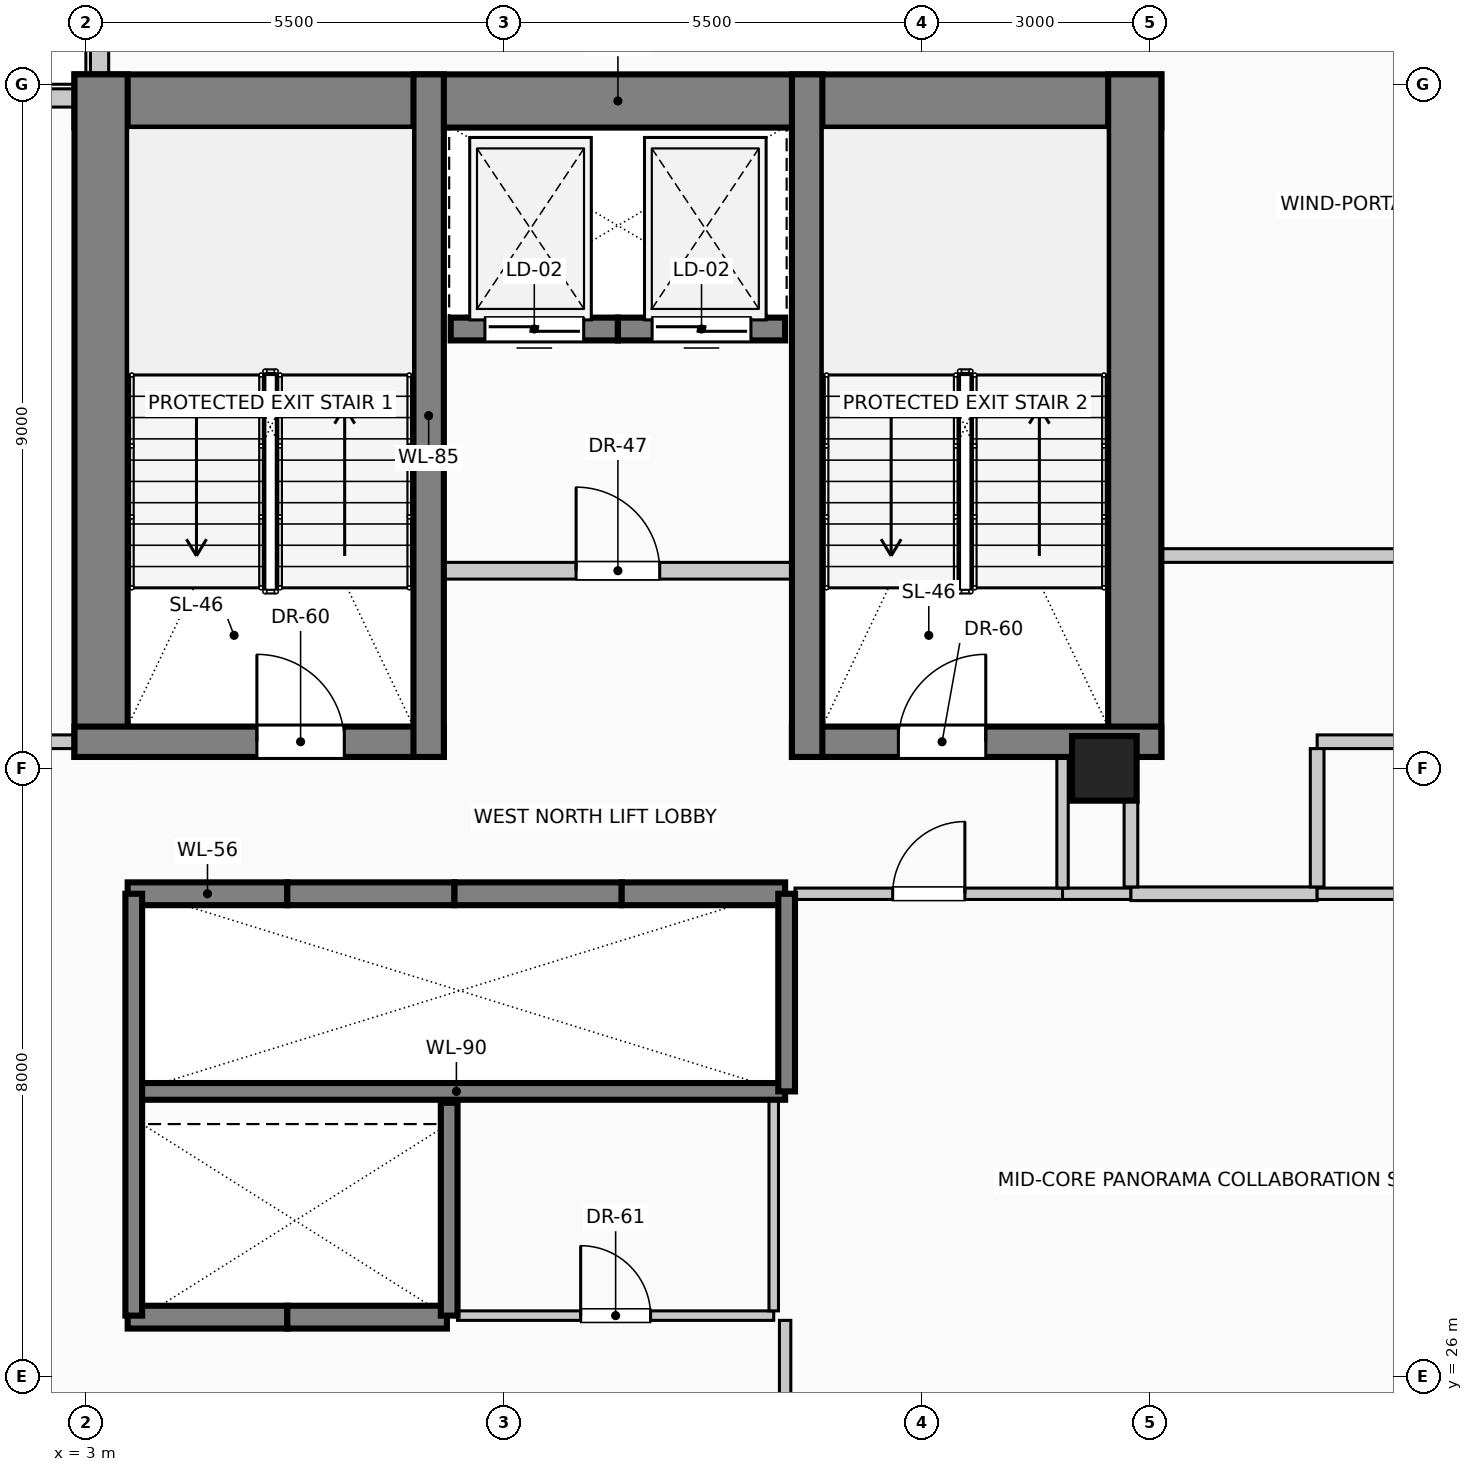
"""IFC4 building model, lengths in metres.
Left out: names, types, materials, properties, quantities, classifications, styles, units other than length and angle.
Written with IfcOpenShell. Run it as: python <this file> out.ifc"""

import sys

from ifc_helpers import new_model, si_unit, direction, frame, frame_2d, origin, origin_2d, place, context, subcontext, project, spatial, rectangle, circle, extrude, element, fill, save


model = new_model("IFC4")
c1 = context("Model", 3, precision=1e-05, world=origin(), true_north=direction((0.0, 1.0)))
c2 = subcontext(c1, "Body", "Model", "MODEL_VIEW")
j1 = project(units=[si_unit("LENGTHUNIT", "METRE"), si_unit("PLANEANGLEUNIT", "RADIAN")], contexts=[c1])
p1 = place(None, origin())
s1 = spatial("IfcSite", under=j1, at=p1, CompositionType="ELEMENT")
p2 = place(p1, origin())
s2 = spatial("IfcBuilding", under=s1, at=p2, CompositionType="ELEMENT")
p3 = place(p2, frame((0.0, 0.0, 198.6)))
s3 = spatial("IfcBuildingStorey", under=s2, at=p3, CompositionType="ELEMENT", Elevation=198.6)
p4 = place(p3, frame((2.85, 42.78, 0.0), z_axis=(0.0, 0.0, 1.0), x_axis=(1.0, 0.0, 0.0)))
e1 = element("IfcWall", 1, at=p4, inside=s3, PredefinedType="SHEAR", context=c2, shape_type="SweptSolid", body=[
    extrude(rectangle(XDim=14.3, YDim=0.7, at=frame_2d((7.15, 0.0))), origin(), (0.0, 0.0, 1.0), 4.0),
])
for number, where, z_axis, x_axis in (
    (2, (3.2, 34.15, 0.0), (0.0, 0.0, 1.0), (0.0, 1.0, 0.0)),
    (3, (16.8, 34.15, 0.0), (0.0, 0.0, 1.0), (0.0, 1.0, 0.0)),
):
    element("IfcWall", number, at=place(p3, frame(where, z_axis=z_axis, x_axis=x_axis)), inside=s3, PredefinedType="SHEAR", context=c2, shape_type="SweptSolid", body=[
        extrude(rectangle(XDim=8.98, YDim=0.7, at=frame_2d((4.49, 0.0))), origin(), (0.0, 0.0, 1.0), 4.0),
    ])
p5 = place(p3, frame((2.85, 34.35, 0.0), z_axis=(0.0, 0.0, 1.0), x_axis=(1.0, 0.0, 0.0)))
e4 = element("IfcWall", 4, at=p5, inside=s3, PredefinedType="SHEAR", context=c2, shape_type="SweptSolid", body=[
    extrude(rectangle(XDim=4.86, YDim=0.4, at=frame_2d((2.43, 0.0))), origin(), (0.0, 0.0, 1.0), 4.0),
])
p6 = place(p5, frame((2.4, 0.0, 0.0)))
e5 = element("IfcOpeningElement", 5, at=p6, cuts=e4, PredefinedType="OPENING", context=c2, shape_type="SweptSolid", body=[
    extrude(rectangle(XDim=1.15, YDim=2.2, at=frame_2d((0.575, 1.1))), frame((0.0, 0.21, 0.0), z_axis=(0.0, -1.0, 0.0), x_axis=(1.0, 0.0, 0.0)), (0.0, 0.0, 1.0), 0.42),
])
p7 = place(p3, frame((12.29, 34.35, 0.0), z_axis=(0.0, 0.0, 1.0), x_axis=(1.0, 0.0, 0.0)))
e6 = element("IfcWall", 6, at=p7, inside=s3, PredefinedType="SHEAR", context=c2, shape_type="SweptSolid", body=[
    extrude(rectangle(XDim=4.86, YDim=0.4, at=frame_2d((2.43, 0.0))), origin(), (0.0, 0.0, 1.0), 4.0),
])
p8 = place(p7, frame((1.4, 0.0, 0.0)))
e7 = element("IfcOpeningElement", 7, at=p8, cuts=e6, PredefinedType="OPENING", context=c2, shape_type="SweptSolid", body=[
    extrude(rectangle(XDim=1.15, YDim=2.2, at=frame_2d((0.575, 1.1))), frame((0.0, 0.21, 0.0), z_axis=(0.0, -1.0, 0.0), x_axis=(1.0, 0.0, 0.0)), (0.0, 0.0, 1.0), 0.42),
])
for number, where, z_axis, x_axis in (
    (8, (7.51, 34.15, 0.0), (0.0, 0.0, 1.0), (0.0, 1.0, 0.0)),
    (9, (12.49, 34.15, 0.0), (0.0, 0.0, 1.0), (0.0, 1.0, 0.0)),
):
    element("IfcWall", number, at=place(p3, frame(where, z_axis=z_axis, x_axis=x_axis)), inside=s3, PredefinedType="SHEAR", context=c2, shape_type="SweptSolid", body=[
        extrude(rectangle(XDim=8.98, YDim=0.4, at=frame_2d((4.49, 0.0))), origin(), (0.0, 0.0, 1.0), 4.0),
    ])
p9 = place(p3, frame((16.4, 34.0, 0.0), z_axis=(0.0, 0.0, 1.0), x_axis=(1.0, 0.0, 0.0)))
e10 = element("IfcColumn", 10, at=p9, inside=s3, PredefinedType="COLUMN", context=c2, shape_type="SweptSolid", body=[
    extrude(circle(Radius=0.425, at=origin_2d()), origin(), (0.0, 0.0, 1.0), 4.0),
])
p10 = place(p3, frame((0.6, 42.82, 0.0), z_axis=(0.0, 0.0, 1.0), x_axis=(1.0, 0.0, 0.0)))
e11 = element("IfcWall", 11, at=p10, inside=s3, PredefinedType="SOLIDWALL", context=c2, shape_type="SweptSolid", body=[
    extrude(rectangle(XDim=2.245, YDim=0.24, at=frame_2d((1.123, 0.0))), origin(), (0.0, 0.0, 1.0), 3.75),
])
p11 = place(p3, frame((3.18, 43.135, 0.0), z_axis=(0.0, 0.0, 1.0), x_axis=(0.0, 1.0, 0.0)))
e12 = element("IfcWall", 12, at=p11, inside=s3, PredefinedType="SOLIDWALL", context=c2, shape_type="SweptSolid", body=[
    extrude(rectangle(XDim=2.265, YDim=0.24, at=frame_2d((1.132, 0.0))), origin(), (0.0, 0.0, 1.0), 3.75),
])
p12 = place(p3, frame((3.55, 32.35, 0.0), z_axis=(0.0, 0.0, 1.0), x_axis=(1.0, 0.0, 0.0)))
e13 = element("IfcWall", 13, at=p12, inside=s3, PredefinedType="SOLIDWALL", context=c2, shape_type="SweptSolid", body=[
    extrude(rectangle(XDim=2.1, YDim=0.3, at=frame_2d((1.05, 0.0))), origin(), (0.0, 0.0, 1.0), 4.0),
])
p13 = place(p3, frame((5.65, 32.35, 0.0), z_axis=(0.0, 0.0, 1.0), x_axis=(1.0, 0.0, 0.0)))
e14 = element("IfcWall", 14, at=p13, inside=s3, PredefinedType="SOLIDWALL", context=c2, shape_type="SweptSolid", body=[
    extrude(rectangle(XDim=2.2, YDim=0.3, at=frame_2d((1.1, 0.0))), origin(), (0.0, 0.0, 1.0), 4.0),
])
p14 = place(p3, frame((7.85, 32.35, 0.0), z_axis=(0.0, 0.0, 1.0), x_axis=(1.0, 0.0, 0.0)))
e15 = element("IfcWall", 15, at=p14, inside=s3, PredefinedType="SOLIDWALL", context=c2, shape_type="SweptSolid", body=[
    extrude(rectangle(XDim=2.2, YDim=0.3, at=frame_2d((1.1, 0.0))), origin(), (0.0, 0.0, 1.0), 4.0),
])
p15 = place(p3, frame((10.05, 32.35, 0.0), z_axis=(0.0, 0.0, 1.0), x_axis=(1.0, 0.0, 0.0)))
e16 = element("IfcWall", 16, at=p15, inside=s3, PredefinedType="SOLIDWALL", context=c2, shape_type="SweptSolid", body=[
    extrude(rectangle(XDim=2.15, YDim=0.3, at=frame_2d((1.075, 0.0))), origin(), (0.0, 0.0, 1.0), 4.0),
])
p16 = place(p3, frame((5.65, 26.78, 0.0), z_axis=(0.0, 0.0, 1.0), x_axis=(-1.0, 0.0, 0.0)))
e17 = element("IfcWall", 17, at=p16, inside=s3, PredefinedType="SOLIDWALL", context=c2, shape_type="SweptSolid", body=[
    extrude(rectangle(XDim=2.1, YDim=0.3, at=frame_2d((1.05, 0.0))), origin(), (0.0, 0.0, 1.0), 4.0),
])
p17 = place(p3, frame((7.75, 26.78, 0.0), z_axis=(0.0, 0.0, 1.0), x_axis=(-1.0, 0.0, 0.0)))
e18 = element("IfcWall", 18, at=p17, inside=s3, PredefinedType="SOLIDWALL", context=c2, shape_type="SweptSolid", body=[
    extrude(rectangle(XDim=2.1, YDim=0.3, at=frame_2d((1.05, 0.0))), origin(), (0.0, 0.0, 1.0), 4.0),
])
p18 = place(p3, frame((10.0, 39.78, 0.0), z_axis=(0.0, 0.0, 1.0), x_axis=(-1.0, 0.0, 0.0)))
e19 = element("IfcWall", 19, at=p18, inside=s3, PredefinedType="SOLIDWALL", context=c2, shape_type="SweptSolid", body=[
    extrude(rectangle(XDim=2.2, YDim=0.3, at=frame_2d((1.1, 0.0))), origin(), (0.0, 0.0, 1.0), 4.0),
])
p19 = place(p18, frame((0.45, 0.0, 0.0)))
e20 = element("IfcOpeningElement", 20, at=p19, cuts=e19, PredefinedType="OPENING", context=c2, shape_type="SweptSolid", body=[
    extrude(rectangle(XDim=1.3, YDim=2.25, at=frame_2d((0.65, 1.125))), frame((0.0, 0.16, 0.0), z_axis=(0.0, -1.0, 0.0), x_axis=(1.0, 0.0, 0.0)), (0.0, 0.0, 1.0), 0.32),
])
p20 = place(p3, frame((12.2, 39.78, 0.0), z_axis=(0.0, 0.0, 1.0), x_axis=(-1.0, 0.0, 0.0)))
e21 = element("IfcWall", 21, at=p20, inside=s3, PredefinedType="SOLIDWALL", context=c2, shape_type="SweptSolid", body=[
    extrude(rectangle(XDim=2.2, YDim=0.3, at=frame_2d((1.1, 0.0))), origin(), (0.0, 0.0, 1.0), 4.0),
])
p21 = place(p20, frame((0.45, 0.0, 0.0)))
e22 = element("IfcOpeningElement", 22, at=p21, cuts=e21, PredefinedType="OPENING", context=c2, shape_type="SweptSolid", body=[
    extrude(rectangle(XDim=1.3, YDim=2.25, at=frame_2d((0.65, 1.125))), frame((0.0, 0.16, 0.0), z_axis=(0.0, -1.0, 0.0), x_axis=(1.0, 0.0, 0.0)), (0.0, 0.0, 1.0), 0.32),
])
p22 = place(p3, frame((3.55, 29.75, 0.0), z_axis=(0.0, 0.0, 1.0), x_axis=(1.0, 0.0, 0.0)))
e23 = element("IfcWall", 23, at=p22, inside=s3, PredefinedType="SOLIDWALL", context=c2, shape_type="SweptSolid", body=[
    extrude(rectangle(XDim=8.65, YDim=0.22, at=frame_2d((4.325, 0.0))), origin(), (0.0, 0.0, 1.0), 4.0),
])
p23 = place(p3, frame((3.63, 26.8, 0.0), z_axis=(0.0, 0.0, 1.0), x_axis=(0.0, 1.0, 0.0)))
e24 = element("IfcWall", 24, at=p23, inside=s3, PredefinedType="SOLIDWALL", context=c2, shape_type="SweptSolid", body=[
    extrude(rectangle(XDim=5.55, YDim=0.22, at=frame_2d((2.775, 0.0))), origin(), (0.0, 0.0, 1.0), 4.0),
])
p24 = place(p3, frame((7.78, 26.8, 0.0), z_axis=(0.0, 0.0, 1.0), x_axis=(0.0, 1.0, 0.0)))
e25 = element("IfcWall", 25, at=p24, inside=s3, PredefinedType="SOLIDWALL", context=c2, shape_type="SweptSolid", body=[
    extrude(rectangle(XDim=2.8, YDim=0.22, at=frame_2d((1.4, 0.0))), origin(), (0.0, 0.0, 1.0), 4.0),
])
p25 = place(p3, frame((12.22, 29.75, 0.0), z_axis=(0.0, 0.0, 1.0), x_axis=(0.0, 1.0, 0.0)))
e26 = element("IfcWall", 26, at=p25, inside=s3, PredefinedType="SOLIDWALL", context=c2, shape_type="SweptSolid", body=[
    extrude(rectangle(XDim=2.6, YDim=0.22, at=frame_2d((1.3, 0.0))), origin(), (0.0, 0.0, 1.0), 4.0),
])
p26 = place(p3, frame((7.51, 36.6, 0.0), z_axis=(0.0, 0.0, 1.0), x_axis=(1.0, 0.0, 0.0)))
e27 = element("IfcWall", 27, at=p26, inside=s3, PredefinedType="PARTITIONING", context=c2, shape_type="SweptSolid", body=[
    extrude(rectangle(XDim=4.98, YDim=0.22, at=frame_2d((2.49, 0.0))), origin(), (0.0, 0.0, 1.0), 3.75),
])
p27 = place(p26, frame((1.94, 0.0, 0.0)))
e28 = element("IfcOpeningElement", 28, at=p27, cuts=e27, PredefinedType="OPENING", context=c2, shape_type="SweptSolid", body=[
    extrude(rectangle(XDim=1.1, YDim=2.2, at=frame_2d((0.55, 1.1))), frame((0.0, 0.12, 0.0), z_axis=(0.0, -1.0, 0.0), x_axis=(1.0, 0.0, 0.0)), (0.0, 0.0, 1.0), 0.24),
])
p28 = place(p3, frame((7.89, 26.8, 0.0), z_axis=(0.0, 0.0, 1.0), x_axis=(1.0, 0.0, 0.0)))
e29 = element("IfcWall", 29, at=p28, inside=s3, PredefinedType="PARTITIONING", context=c2, shape_type="SweptSolid", body=[
    extrude(rectangle(XDim=4.16, YDim=0.125, at=frame_2d((2.08, 0.0))), origin(), (0.0, 0.0, 1.0), 3.75),
])
p29 = place(p28, frame((1.62, 0.0, 0.0)))
e30 = element("IfcOpeningElement", 30, at=p29, cuts=e29, PredefinedType="OPENING", context=c2, shape_type="SweptSolid", body=[
    extrude(rectangle(XDim=0.92, YDim=2.1, at=frame_2d((0.46, 1.05))), frame((0.0, 0.073, 0.0), z_axis=(0.0, -1.0, 0.0), x_axis=(1.0, 0.0, 0.0)), (0.0, 0.0, 1.0), 0.145),
])
p30 = place(p3, frame((12.33, 32.35, 0.0), z_axis=(0.0, 0.0, 1.0), x_axis=(1.0, 0.0, 0.0)))
e31 = element("IfcWall", 31, at=p30, inside=s3, PredefinedType="PARTITIONING", context=c2, shape_type="SweptSolid", body=[
    extrude(rectangle(XDim=3.52, YDim=0.15, at=frame_2d((1.76, 0.0))), origin(), (0.0, 0.0, 1.0), 3.75),
])
p31 = place(p30, frame((1.285, 0.0, 0.0)))
e32 = element("IfcOpeningElement", 32, at=p31, cuts=e31, PredefinedType="OPENING", context=c2, shape_type="SweptSolid", body=[
    extrude(rectangle(XDim=0.95, YDim=2.15, at=frame_2d((0.475, 1.075))), frame((0.0, 0.085, 0.0), z_axis=(0.0, -1.0, 0.0), x_axis=(1.0, 0.0, 0.0)), (0.0, 0.0, 1.0), 0.17),
])
p32 = place(p3, frame((15.85, 32.35, 0.0), z_axis=(0.0, 0.0, 1.0), x_axis=(1.0, 0.0, 0.0)))
e33 = element("IfcWall", 33, at=p32, inside=s3, PredefinedType="PARTITIONING", context=c2, shape_type="SweptSolid", body=[
    extrude(rectangle(XDim=0.9, YDim=0.15, at=frame_2d((0.45, 0.0))), origin(), (0.0, 0.0, 1.0), 3.75),
])
p33 = place(p3, frame((16.75, 32.35, 0.0), z_axis=(0.0, 0.0, 1.0), x_axis=(1.0, 0.0, 0.0)))
e34 = element("IfcWall", 34, at=p33, inside=s3, PredefinedType="PARTITIONING", context=c2, shape_type="SweptSolid", body=[
    extrude(rectangle(XDim=2.45, YDim=0.18, at=frame_2d((1.225, 0.0))), origin(), (0.0, 0.0, 1.0), 3.75),
])
p34 = place(p3, frame((19.2, 32.35, 0.0), z_axis=(0.0, 0.0, 1.0), x_axis=(1.0, 0.0, 0.0)))
e35 = element("IfcWall", 35, at=p34, inside=s3, PredefinedType="PARTITIONING", context=c2, shape_type="SweptSolid", body=[
    extrude(rectangle(XDim=4.68, YDim=0.15, at=frame_2d((2.34, 0.0))), origin(), (0.0, 0.0, 1.0), 3.75),
])
p35 = place(p3, frame((1.15, 34.35, 0.0), z_axis=(0.0, 0.0, 1.0), x_axis=(1.0, 0.0, 0.0)))
e36 = element("IfcWall", 36, at=p35, inside=s3, PredefinedType="PARTITIONING", context=c2, shape_type="SweptSolid", body=[
    extrude(rectangle(XDim=1.7, YDim=0.18, at=frame_2d((0.85, 0.0))), origin(), (0.0, 0.0, 1.0), 3.75),
])
p36 = place(p3, frame((19.2, 34.35, 0.0), z_axis=(0.0, 0.0, 1.0), x_axis=(1.0, 0.0, 0.0)))
e37 = element("IfcWall", 37, at=p36, inside=s3, PredefinedType="PARTITIONING", context=c2, shape_type="SweptSolid", body=[
    extrude(rectangle(XDim=4.3, YDim=0.18, at=frame_2d((2.15, 0.0))), origin(), (0.0, 0.0, 1.0), 3.75),
])
p37 = place(p3, frame((17.15, 36.8, 0.0), z_axis=(0.0, 0.0, 1.0), x_axis=(1.0, 0.0, 0.0)))
e38 = element("IfcWall", 38, at=p37, inside=s3, PredefinedType="PARTITIONING", context=c2, shape_type="SweptSolid", body=[
    extrude(rectangle(XDim=8.35, YDim=0.18, at=frame_2d((4.175, 0.0))), origin(), (0.0, 0.0, 1.0), 3.75),
])
p38 = place(p37, frame((3.7, 0.0, 0.0)))
e39 = element("IfcOpeningElement", 39, at=p38, cuts=e38, PredefinedType="OPENING", context=c2, shape_type="SweptSolid", body=[
    extrude(rectangle(XDim=0.95, YDim=2.15, at=frame_2d((0.475, 1.075))), frame((0.0, 0.1, 0.0), z_axis=(0.0, -1.0, 0.0), x_axis=(1.0, 0.0, 0.0)), (0.0, 0.0, 1.0), 0.2),
])
p39 = place(p3, frame((12.05, 26.863, 0.0), z_axis=(0.0, 0.0, 1.0), x_axis=(0.0, 1.0, 0.0)))
e40 = element("IfcWall", 40, at=p39, inside=s3, PredefinedType="PARTITIONING", context=c2, shape_type="SweptSolid", body=[
    extrude(rectangle(XDim=2.777, YDim=0.125, at=frame_2d((1.389, 0.0))), origin(), (0.0, 0.0, 1.0), 3.75),
])
p40 = place(p3, frame((12.2, 24.863, 0.0), z_axis=(0.0, 0.0, 1.0), x_axis=(0.0, 1.0, 0.0)))
e41 = element("IfcWall", 41, at=p40, inside=s3, PredefinedType="PARTITIONING", context=c2, shape_type="SweptSolid", body=[
    extrude(rectangle(XDim=1.875, YDim=0.15, at=frame_2d((0.938, 0.0))), origin(), (0.0, 0.0, 1.0), 3.75),
])
p41 = place(p3, frame((15.85, 32.425, 0.0), z_axis=(0.0, 0.0, 1.0), x_axis=(0.0, 1.0, 0.0)))
e42 = element("IfcWall", 42, at=p41, inside=s3, PredefinedType="PARTITIONING", context=c2, shape_type="SweptSolid", body=[
    extrude(rectangle(XDim=1.725, YDim=0.15, at=frame_2d((0.862, 0.0))), origin(), (0.0, 0.0, 1.0), 3.75),
])
p42 = place(p3, frame((16.75, 32.44, 0.0), z_axis=(0.0, 0.0, 1.0), x_axis=(0.0, 1.0, 0.0)))
e43 = element("IfcWall", 43, at=p42, inside=s3, PredefinedType="PARTITIONING", context=c2, shape_type="SweptSolid", body=[
    extrude(rectangle(XDim=1.135, YDim=0.18, at=frame_2d((0.567, 0.0))), origin(), (0.0, 0.0, 1.0), 3.75),
])
p43 = place(p3, frame((19.2, 32.44, 0.0), z_axis=(0.0, 0.0, 1.0), x_axis=(0.0, 1.0, 0.0)))
e44 = element("IfcWall", 44, at=p43, inside=s3, PredefinedType="PARTITIONING", context=c2, shape_type="SweptSolid", body=[
    extrude(rectangle(XDim=1.82, YDim=0.18, at=frame_2d((0.91, 0.0))), origin(), (0.0, 0.0, 1.0), 3.75),
])
p44 = place(p19, origin())
e45 = element("IfcDoor", 45, at=p44, inside=s3, OperationType="SLIDING_TO_LEFT", PredefinedType="DOOR", context=c2, shape_type="SweptSolid", body=[
    extrude(rectangle(XDim=1.3, YDim=2.25, at=frame_2d((0.65, 1.125))), frame((0.0, 0.025, 0.0), z_axis=(0.0, -1.0, 0.0), x_axis=(1.0, 0.0, 0.0)), (0.0, 0.0, 1.0), 0.05),
])
fill(e20, e45)
p45 = place(p21, origin())
e46 = element("IfcDoor", 46, at=p45, inside=s3, OperationType="SLIDING_TO_RIGHT", PredefinedType="DOOR", context=c2, shape_type="SweptSolid", body=[
    extrude(rectangle(XDim=1.3, YDim=2.25, at=frame_2d((0.65, 1.125))), frame((0.0, 0.025, 0.0), z_axis=(0.0, -1.0, 0.0), x_axis=(1.0, 0.0, 0.0)), (0.0, 0.0, 1.0), 0.05),
])
fill(e22, e46)
p46 = place(p6, origin())
e47 = element("IfcDoor", 47, at=p46, inside=s3, OperationType="SINGLE_SWING_LEFT", PredefinedType="DOOR", context=c2, shape_type="SweptSolid", body=[
    extrude(rectangle(XDim=1.15, YDim=2.2, at=frame_2d((0.575, 1.1))), frame((0.0, 0.025, 0.0), z_axis=(0.0, -1.0, 0.0), x_axis=(1.0, 0.0, 0.0)), (0.0, 0.0, 1.0), 0.05),
])
fill(e5, e47)
p47 = place(p8, origin())
e48 = element("IfcDoor", 48, at=p47, inside=s3, OperationType="SINGLE_SWING_RIGHT", PredefinedType="DOOR", context=c2, shape_type="SweptSolid", body=[
    extrude(rectangle(XDim=1.15, YDim=2.2, at=frame_2d((0.575, 1.1))), frame((0.0, 0.025, 0.0), z_axis=(0.0, -1.0, 0.0), x_axis=(1.0, 0.0, 0.0)), (0.0, 0.0, 1.0), 0.05),
])
fill(e7, e48)
p48 = place(p27, origin())
e49 = element("IfcDoor", 49, at=p48, inside=s3, OperationType="SINGLE_SWING_LEFT", PredefinedType="DOOR", context=c2, shape_type="SweptSolid", body=[
    extrude(rectangle(XDim=1.1, YDim=2.2, at=frame_2d((0.55, 1.1))), frame((0.0, 0.025, 0.0), z_axis=(0.0, -1.0, 0.0), x_axis=(1.0, 0.0, 0.0)), (0.0, 0.0, 1.0), 0.05),
])
fill(e28, e49)
p49 = place(p29, origin())
e50 = element("IfcDoor", 50, at=p49, inside=s3, OperationType="SINGLE_SWING_LEFT", PredefinedType="DOOR", context=c2, shape_type="SweptSolid", body=[
    extrude(rectangle(XDim=0.92, YDim=2.1, at=frame_2d((0.46, 1.05))), frame((0.0, 0.025, 0.0), z_axis=(0.0, -1.0, 0.0), x_axis=(1.0, 0.0, 0.0)), (0.0, 0.0, 1.0), 0.05),
])
fill(e30, e50)
p50 = place(p31, origin())
e51 = element("IfcDoor", 51, at=p50, inside=s3, OperationType="SINGLE_SWING_RIGHT", PredefinedType="DOOR", context=c2, shape_type="SweptSolid", body=[
    extrude(rectangle(XDim=0.95, YDim=2.15, at=frame_2d((0.475, 1.075))), frame((0.0, 0.025, 0.0), z_axis=(0.0, -1.0, 0.0), x_axis=(1.0, 0.0, 0.0)), (0.0, 0.0, 1.0), 0.05),
])
fill(e32, e51)
save(model, sys.argv[1])
